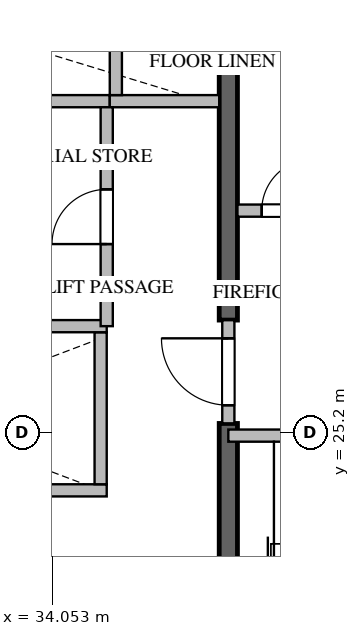
"""IFC4 building model, lengths in metres.
Left out: names, types, materials, properties, quantities, classifications, styles, units other than length and angle.
Written with IfcOpenShell. Run it as: python <this file> out.ifc"""

import sys

from ifc_helpers import new_model, si_unit, direction, frame, frame_2d, origin, place, context, subcontext, project, spatial, rectangle, extrude, source, transform, mapped, element, fill, save


model = new_model("IFC4")
c1 = context("Model", 3, precision=1e-05, world=origin(), true_north=direction((0.0, 1.0)))
c2 = subcontext(c1, "Body", "Model", "MODEL_VIEW")
j1 = project(units=[si_unit("LENGTHUNIT", "METRE"), si_unit("PLANEANGLEUNIT", "RADIAN")], contexts=[c1])
p1 = place(None, origin())
s1 = spatial("IfcSite", under=j1, at=p1, CompositionType="ELEMENT")
p2 = place(p1, origin())
s2 = spatial("IfcBuilding", under=s1, at=p2, CompositionType="ELEMENT")
p3 = place(p2, frame((0.0, 0.0, 79.2)))
s3 = spatial("IfcBuildingStorey", under=s2, at=p3, CompositionType="ELEMENT", Elevation=79.2)
p4 = place(p3, frame((36.95, 17.025, -0.26), z_axis=(0.0, 0.0, 1.0), x_axis=(0.0, 1.0, 0.0)))
e1 = element("IfcWall", 1, at=p4, inside=s3, PredefinedType="SHEAR", context=c2, shape_type="SweptSolid", body=[
    extrude(rectangle(XDim=8.325, YDim=0.3, at=frame_2d((4.163, 0.0))), origin(), (0.0, 0.0, 1.0), 3.748),
])
p5 = place(p3, frame((36.95, 27.05, -0.26), z_axis=(0.0, 0.0, 1.0), x_axis=(0.0, 1.0, 0.0)))
e2 = element("IfcWall", 2, at=p5, inside=s3, PredefinedType="SHEAR", context=c2, shape_type="SweptSolid", body=[
    extrude(rectangle(XDim=6.325, YDim=0.3, at=frame_2d((3.163, 0.0))), origin(), (0.0, 0.0, 1.0), 3.748),
])
p6 = place(p3, frame((36.95, 25.15, 0.0), z_axis=(0.0, 0.0, 1.0), x_axis=(1.0, 0.0, 0.0)))
e3 = element("IfcWall", 3, at=p6, inside=s3, PredefinedType="STANDARD", context=c2, shape_type="SweptSolid", body=[
    extrude(rectangle(XDim=4.45, YDim=0.2, at=frame_2d((2.225, 0.0))), origin(), (0.0, 0.0, 1.0), 3.49),
])
p7 = place(p6, frame((1.65, 0.0, 0.0)))
e4 = element("IfcOpeningElement", 4, at=p7, cuts=e3, PredefinedType="OPENING", context=c2, shape_type="SweptSolid", body=[
    extrude(rectangle(XDim=1.1, YDim=2.15, at=frame_2d((0.55, 1.075))), frame((0.0, 0.11, 0.0), z_axis=(0.0, -1.0, 0.0), x_axis=(1.0, 0.0, 0.0)), (0.0, 0.0, 1.0), 0.22),
])
p8 = place(p3, frame((32.675, 24.25, 0.0), z_axis=(0.0, 0.0, 1.0), x_axis=(1.0, 0.0, 0.0)))
e5 = element("IfcWall", 5, at=p8, inside=s3, PredefinedType="STANDARD", context=c2, shape_type="SweptSolid", body=[
    extrude(rectangle(XDim=2.275, YDim=0.2, at=frame_2d((1.137, 0.0))), origin(), (0.0, 0.0, 1.0), 3.49),
])
p9 = place(p3, frame((34.85, 24.35, 0.0), z_axis=(0.0, 0.0, 1.0), x_axis=(0.0, 1.0, 0.0)))
e6 = element("IfcWall", 6, at=p9, inside=s3, PredefinedType="STANDARD", context=c2, shape_type="SweptSolid", body=[
    extrude(rectangle(XDim=2.5, YDim=0.2, at=frame_2d((1.25, 0.0))), origin(), (0.0, 0.0, 1.0), 3.49),
])
p10 = place(p3, frame((32.85, 30.65, 0.0), z_axis=(0.0, 0.0, 1.0), x_axis=(1.0, 0.0, 0.0)))
e7 = element("IfcWall", 7, at=p10, inside=s3, PredefinedType="STANDARD", context=c2, shape_type="SweptSolid", body=[
    extrude(rectangle(XDim=2.15, YDim=0.2, at=frame_2d((1.075, 0.0))), origin(), (0.0, 0.0, 1.0), 3.49),
])
p11 = place(p3, frame((35.0, 30.65, 0.0), z_axis=(0.0, 0.0, 1.0), x_axis=(1.0, 0.0, 0.0)))
e8 = element("IfcWall", 8, at=p11, inside=s3, PredefinedType="STANDARD", context=c2, shape_type="SweptSolid", body=[
    extrude(rectangle(XDim=1.8, YDim=0.2, at=frame_2d((0.9, 0.0))), origin(), (0.0, 0.0, 1.0), 3.49),
])
p12 = place(p3, frame((35.1, 30.75, 0.0), z_axis=(0.0, 0.0, 1.0), x_axis=(0.0, 1.0, 0.0)))
e9 = element("IfcWall", 9, at=p12, inside=s3, PredefinedType="STANDARD", context=c2, shape_type="SweptSolid", body=[
    extrude(rectangle(XDim=2.625, YDim=0.2, at=frame_2d((1.312, 0.0))), origin(), (0.0, 0.0, 1.0), 3.49),
])
p13 = place(p3, frame((37.1, 28.85, 0.0), z_axis=(0.0, 0.0, 1.0), x_axis=(1.0, 0.0, 0.0)))
e10 = element("IfcWall", 10, at=p13, inside=s3, PredefinedType="STANDARD", context=c2, shape_type="SweptSolid", body=[
    extrude(rectangle(XDim=1.648, YDim=0.2, at=frame_2d((0.824, 0.0))), origin(), (0.0, 0.0, 1.0), 3.49),
])
p14 = place(p13, frame((0.399, 0.0, 0.0)))
e11 = element("IfcOpeningElement", 11, at=p14, cuts=e10, PredefinedType="OPENING", context=c2, shape_type="SweptSolid", body=[
    extrude(rectangle(XDim=0.85, YDim=2.1, at=frame_2d((0.425, 1.05))), frame((0.0, 0.11, 0.0), z_axis=(0.0, -1.0, 0.0), x_axis=(1.0, 0.0, 0.0)), (0.0, 0.0, 1.0), 0.22),
])
p15 = place(p3, frame((36.95, 25.352, 0.0), z_axis=(0.0, 0.0, 1.0), x_axis=(0.0, 1.0, 0.0)))
e12 = element("IfcWall", 12, at=p15, inside=s3, PredefinedType="STANDARD", context=c2, shape_type="SweptSolid", body=[
    extrude(rectangle(XDim=1.696, YDim=0.2, at=frame_2d((0.848, 0.0))), origin(), (0.0, 0.0, 1.0), 3.49),
])
p16 = place(p15, frame((0.298, 0.0, 0.0)))
e13 = element("IfcOpeningElement", 13, at=p16, cuts=e12, PredefinedType="OPENING", context=c2, shape_type="SweptSolid", body=[
    extrude(rectangle(XDim=1.1, YDim=2.15, at=frame_2d((0.55, 1.075))), frame((0.0, 0.11, 0.0), z_axis=(0.0, -1.0, 0.0), x_axis=(1.0, 0.0, 0.0)), (0.0, 0.0, 1.0), 0.22),
])
p17 = place(p3, frame((28.0, 26.95, 0.0), z_axis=(0.0, 0.0, 1.0), x_axis=(1.0, 0.0, 0.0)))
e14 = element("IfcWall", 14, at=p17, inside=s3, PredefinedType="STANDARD", context=c2, shape_type="SweptSolid", body=[
    extrude(rectangle(XDim=6.95, YDim=0.2, at=frame_2d((3.475, 0.0))), origin(), (0.0, 0.0, 1.0), 3.49),
])
p18 = place(p3, frame((34.95, 26.95, 0.0), z_axis=(0.0, 0.0, 1.0), x_axis=(0.0, 1.0, 0.0)))
e15 = element("IfcWall", 15, at=p18, inside=s3, PredefinedType="STANDARD", context=c2, shape_type="SweptSolid", body=[
    extrude(rectangle(XDim=3.6, YDim=0.2, at=frame_2d((1.8, 0.0))), origin(), (0.0, 0.0, 1.0), 3.49),
])
p19 = place(p18, frame((1.35, 0.0, 0.0)))
e16 = element("IfcOpeningElement", 16, at=p19, cuts=e15, PredefinedType="OPENING", context=c2, shape_type="SweptSolid", body=[
    extrude(rectangle(XDim=0.9, YDim=2.1, at=frame_2d((0.45, 1.05))), frame((0.0, 0.11, 0.0), z_axis=(0.0, -1.0, 0.0), x_axis=(1.0, 0.0, 0.0)), (0.0, 0.0, 1.0), 0.22),
])
m1 = source(origin(), c2, "Body", "SweptSolid", [
    extrude(rectangle(XDim=0.85, YDim=2.1, at=frame_2d((0.425, 1.05))), frame((0.0, 0.025, 0.0), z_axis=(0.0, -1.0, 0.0), x_axis=(1.0, 0.0, 0.0)), (0.0, 0.0, 1.0), 0.05),
])
p20 = place(p14, origin())
e17 = element("IfcDoor", 17, at=p20, inside=s3, OperationType="SINGLE_SWING_RIGHT", PredefinedType="DOOR", context=c2, shape_type="MappedRepresentation", body=[
    mapped(m1, transform((0.0, 0.0, 0.0), scale=1.0)),
])
fill(e11, e17)
m2 = source(origin(), c2, "Body", "SweptSolid", [
    extrude(rectangle(XDim=1.1, YDim=2.15, at=frame_2d((0.55, 1.075))), frame((0.0, 0.025, 0.0), z_axis=(0.0, -1.0, 0.0), x_axis=(1.0, 0.0, 0.0)), (0.0, 0.0, 1.0), 0.05),
])
p21 = place(p16, origin())
e18 = element("IfcDoor", 18, at=p21, inside=s3, OperationType="SINGLE_SWING_RIGHT", PredefinedType="DOOR", context=c2, shape_type="MappedRepresentation", body=[
    mapped(m2, transform((0.0, 0.0, 0.0), scale=1.0)),
])
fill(e13, e18)
m3 = source(origin(), c2, "Body", "SweptSolid", [
    extrude(rectangle(XDim=0.9, YDim=2.1, at=frame_2d((0.45, 1.05))), frame((0.0, 0.025, 0.0), z_axis=(0.0, -1.0, 0.0), x_axis=(1.0, 0.0, 0.0)), (0.0, 0.0, 1.0), 0.05),
])
p22 = place(p19, origin())
e19 = element("IfcDoor", 19, at=p22, inside=s3, OperationType="SINGLE_SWING_LEFT", PredefinedType="DOOR", context=c2, shape_type="MappedRepresentation", body=[
    mapped(m3, transform((0.0, 0.0, 0.0), scale=1.0)),
])
fill(e16, e19)
save(model, sys.argv[1])
